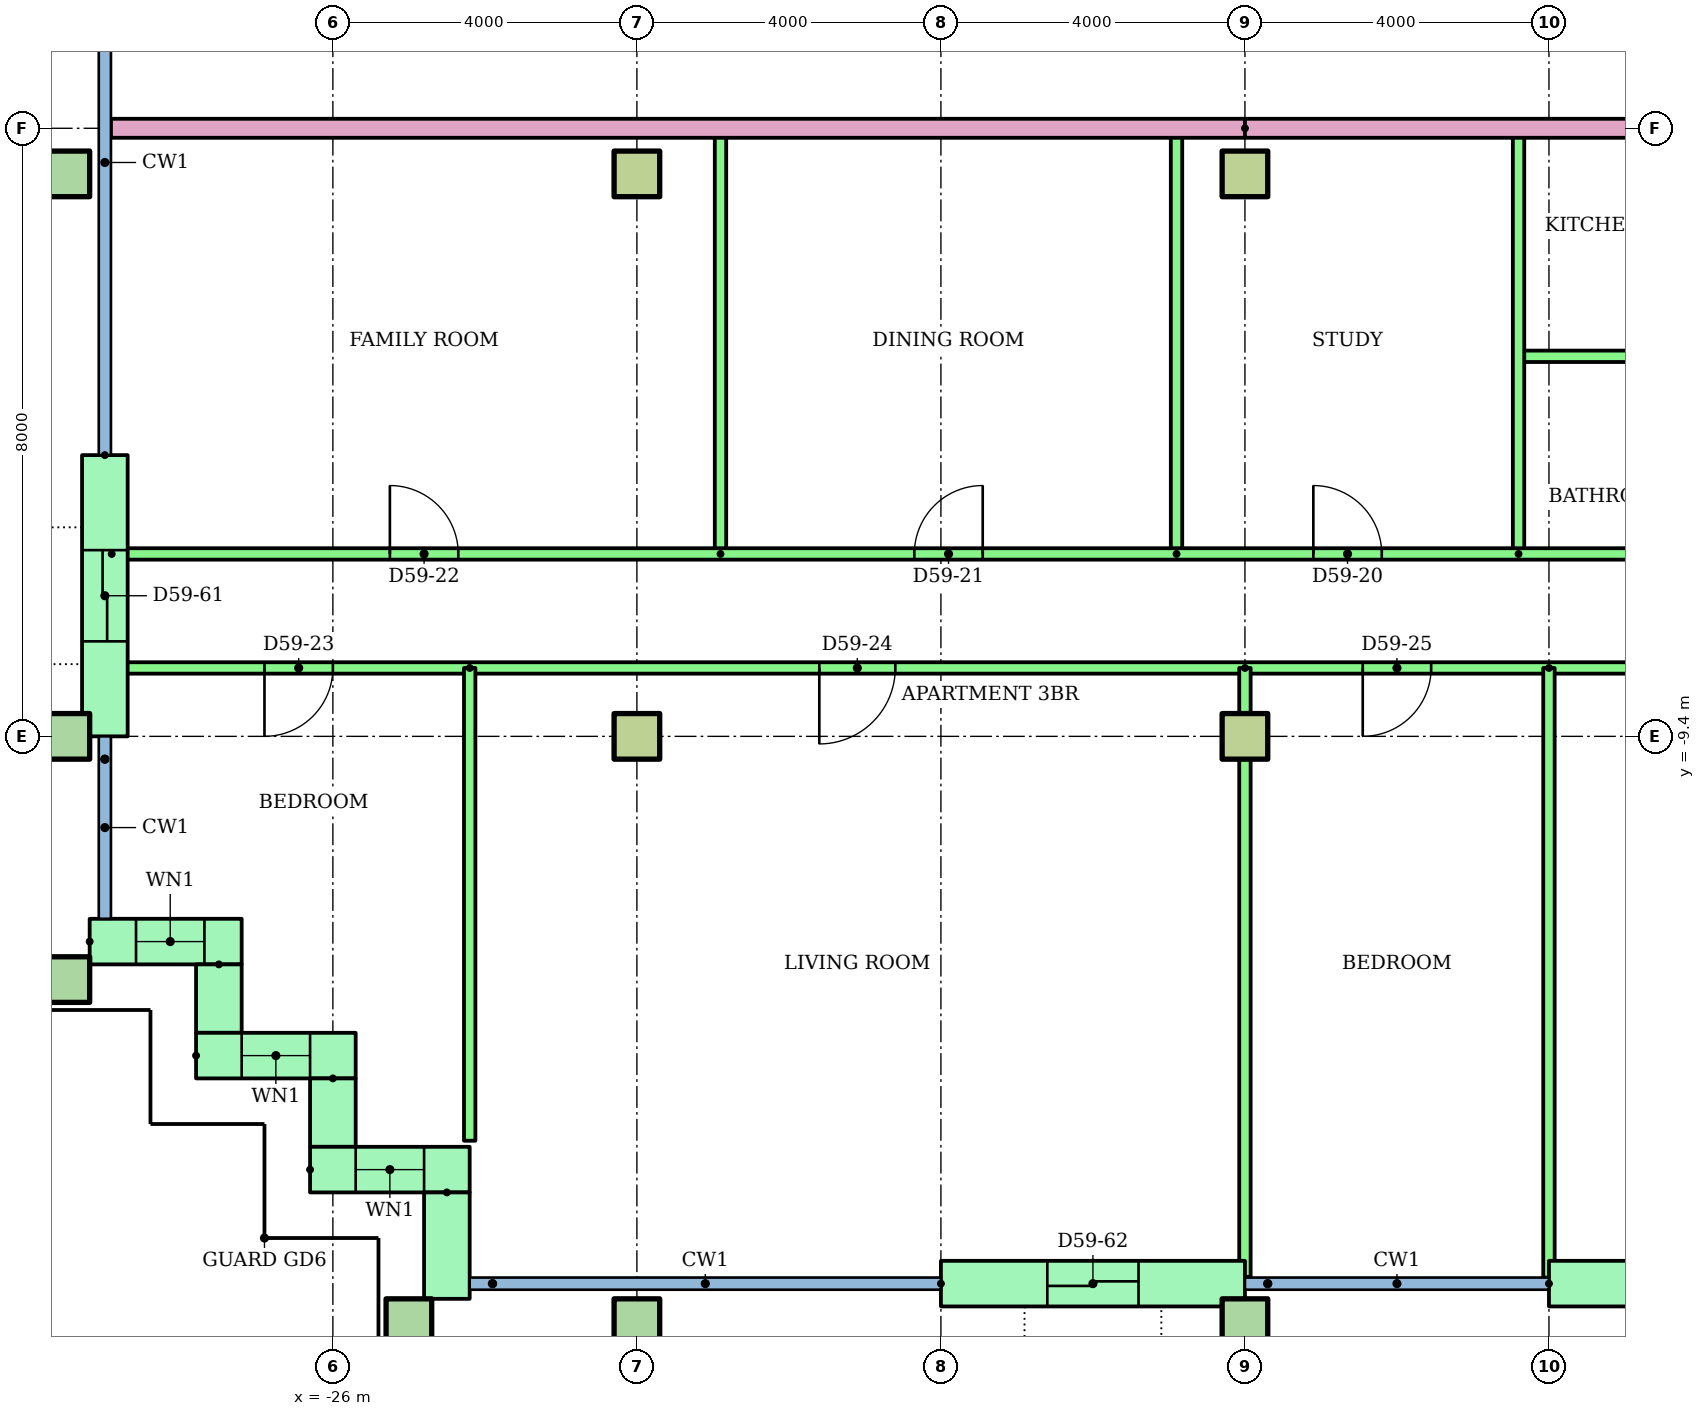
"""IFC4 building model, lengths in metres.
Left out: names, types, materials, properties, quantities, classifications, styles, units other than length and angle.
Written with IfcOpenShell. Run it as: python <this file> out.ifc"""

import sys

from ifc_helpers import new_model, si_unit, direction, frame, frame_2d, origin, origin_2d, place, context, subcontext, project, spatial, rectangle, hollow_rectangle, extrude, element, fill, save


model = new_model("IFC4")
c1 = context("Model", 3, precision=1e-05, world=origin(), true_north=direction((0.0, 1.0)))
c2 = subcontext(c1, "Body", "Model", "MODEL_VIEW")
j1 = project(units=[si_unit("LENGTHUNIT", "METRE"), si_unit("PLANEANGLEUNIT", "RADIAN")], contexts=[c1])
p1 = place(None, origin())
s1 = spatial("IfcSite", under=j1, at=p1, CompositionType="ELEMENT")
p2 = place(p1, origin())
s2 = spatial("IfcBuilding", under=s1, at=p2, CompositionType="ELEMENT")
p3 = place(p2, frame((0.0, 0.0, 226.8)))
s3 = spatial("IfcBuildingStorey", under=s2, at=p3, CompositionType="ELEMENT", Elevation=226.8)
for number, where in (
    (1, (-25.0, -17.1, 0.0)),
    (2, (-22.0, -17.1, 0.0)),
    (3, (-14.0, -17.1, 0.0)),
    (4, (-29.5, -12.6, 0.0)),
    (5, (-29.5, -9.4, 0.0)),
):
    element("IfcColumn", number, at=place(p3, frame(where)), inside=s3, PredefinedType="COLUMN", context=c2, shape_type="SweptSolid", body=[
        extrude(hollow_rectangle(XDim=0.6, YDim=0.6, WallThickness=0.03, at=origin_2d()), origin(), (0.0, 0.0, 1.0), 3.2),
    ])
for number, where in (
    (6, (-22.0, -9.4, 0.0)),
    (7, (-14.0, -9.4, 0.0)),
):
    element("IfcColumn", number, at=place(p3, frame(where)), inside=s3, PredefinedType="COLUMN", context=c2, shape_type="SweptSolid", body=[
        extrude(rectangle(XDim=0.6, YDim=0.6, at=origin_2d()), origin(), (0.0, 0.0, 1.0), 3.2),
    ])
p4 = place(p3, frame((-29.5, -2.0, 0.0)))
e8 = element("IfcColumn", 8, at=p4, inside=s3, PredefinedType="COLUMN", context=c2, shape_type="SweptSolid", body=[
    extrude(hollow_rectangle(XDim=0.6, YDim=0.6, WallThickness=0.03, at=origin_2d()), origin(), (0.0, 0.0, 1.0), 3.2),
])
for number, where in (
    (9, (-22.0, -2.0, 0.0)),
    (10, (-14.0, -2.0, 0.0)),
):
    element("IfcColumn", number, at=place(p3, frame(where)), inside=s3, PredefinedType="COLUMN", context=c2, shape_type="SweptSolid", body=[
        extrude(rectangle(XDim=0.6, YDim=0.6, at=origin_2d()), origin(), (0.0, 0.0, 1.0), 3.2),
    ])
p5 = place(p3, frame((-29.0, -5.7, 0.0), z_axis=(0.0, 0.0, 1.0), x_axis=(0.0, -1.0, 0.0)))
e11 = element("IfcWall", 11, at=p5, inside=s3, PredefinedType="STANDARD", context=c2, shape_type="SweptSolid", body=[
    extrude(rectangle(XDim=3.7, YDim=0.6, at=frame_2d((1.85, 0.0))), origin(), (0.0, 0.0, 1.0), 2.92),
])
p6 = place(p5, frame((1.25, 0.0, 0.0)))
e12 = element("IfcOpeningElement", 12, at=p6, cuts=e11, PredefinedType="OPENING", context=c2, shape_type="SweptSolid", body=[
    extrude(rectangle(XDim=1.2, YDim=2.1, at=frame_2d((0.6, 1.05))), frame((0.0, 0.31, 0.0), z_axis=(0.0, -1.0, 0.0), x_axis=(1.0, 0.0, 0.0)), (0.0, 0.0, 1.0), 0.62),
])
p7 = place(p3, frame((-29.2, -12.1, 0.0)))
e13 = element("IfcWall", 13, at=p7, inside=s3, PredefinedType="STANDARD", context=c2, shape_type="SweptSolid", body=[
    extrude(rectangle(XDim=2.0, YDim=0.6, at=frame_2d((1.0, 0.0))), origin(), (0.0, 0.0, 1.0), 2.92),
])
p8 = place(p7, frame((0.61, 0.0, 0.9)))
e14 = element("IfcOpeningElement", 14, at=p8, cuts=e13, PredefinedType="OPENING", context=c2, shape_type="SweptSolid", body=[
    extrude(rectangle(XDim=0.9, YDim=1.5, at=frame_2d((0.45, 0.75))), frame((0.0, 0.31, 0.0), z_axis=(0.0, -1.0, 0.0), x_axis=(1.0, 0.0, 0.0)), (0.0, 0.0, 1.0), 0.62),
])
p9 = place(p3, frame((-27.5, -12.4, 0.0), z_axis=(0.0, 0.0, 1.0), x_axis=(0.0, -1.0, 0.0)))
e15 = element("IfcWall", 15, at=p9, inside=s3, PredefinedType="STANDARD", context=c2, shape_type="SweptSolid", body=[
    extrude(rectangle(XDim=0.9, YDim=0.6, at=frame_2d((0.45, 0.0))), origin(), (0.0, 0.0, 1.0), 2.92),
])
p10 = place(p3, frame((-27.8, -13.6, 0.0)))
e16 = element("IfcWall", 16, at=p10, inside=s3, PredefinedType="STANDARD", context=c2, shape_type="SweptSolid", body=[
    extrude(rectangle(XDim=2.1, YDim=0.6, at=frame_2d((1.05, 0.0))), origin(), (0.0, 0.0, 1.0), 2.92),
])
p11 = place(p10, frame((0.6, 0.0, 0.9)))
e17 = element("IfcOpeningElement", 17, at=p11, cuts=e16, PredefinedType="OPENING", context=c2, shape_type="SweptSolid", body=[
    extrude(rectangle(XDim=0.9, YDim=1.5, at=frame_2d((0.45, 0.75))), frame((0.0, 0.31, 0.0), z_axis=(0.0, -1.0, 0.0), x_axis=(1.0, 0.0, 0.0)), (0.0, 0.0, 1.0), 0.62),
])
p12 = place(p3, frame((-26.0, -13.9, 0.0), z_axis=(0.0, 0.0, 1.0), x_axis=(0.0, -1.0, 0.0)))
e18 = element("IfcWall", 18, at=p12, inside=s3, PredefinedType="STANDARD", context=c2, shape_type="SweptSolid", body=[
    extrude(rectangle(XDim=0.9, YDim=0.6, at=frame_2d((0.45, 0.0))), origin(), (0.0, 0.0, 1.0), 2.92),
])
p13 = place(p3, frame((-26.3, -15.1, 0.0)))
e19 = element("IfcWall", 19, at=p13, inside=s3, PredefinedType="STANDARD", context=c2, shape_type="SweptSolid", body=[
    extrude(rectangle(XDim=2.1, YDim=0.6, at=frame_2d((1.05, 0.0))), origin(), (0.0, 0.0, 1.0), 2.92),
])
p14 = place(p13, frame((0.6, 0.0, 0.9)))
e20 = element("IfcOpeningElement", 20, at=p14, cuts=e19, PredefinedType="OPENING", context=c2, shape_type="SweptSolid", body=[
    extrude(rectangle(XDim=0.9, YDim=1.5, at=frame_2d((0.45, 0.75))), frame((0.0, 0.31, 0.0), z_axis=(0.0, -1.0, 0.0), x_axis=(1.0, 0.0, 0.0)), (0.0, 0.0, 1.0), 0.62),
])
p15 = place(p3, frame((-24.5, -15.4, 0.0), z_axis=(0.0, 0.0, 1.0), x_axis=(0.0, -1.0, 0.0)))
e21 = element("IfcWall", 21, at=p15, inside=s3, PredefinedType="STANDARD", context=c2, shape_type="SweptSolid", body=[
    extrude(rectangle(XDim=1.4, YDim=0.6, at=frame_2d((0.7, 0.0))), origin(), (0.0, 0.0, 1.0), 2.92),
])
p16 = place(p3, frame((-18.0, -16.6, 0.0)))
e22 = element("IfcWall", 22, at=p16, inside=s3, PredefinedType="STANDARD", context=c2, shape_type="SweptSolid", body=[
    extrude(rectangle(XDim=4.0, YDim=0.6, at=frame_2d((2.0, 0.0))), origin(), (0.0, 0.0, 1.0), 2.92),
])
p17 = place(p16, frame((1.4, 0.0, 0.0)))
e23 = element("IfcOpeningElement", 23, at=p17, cuts=e22, PredefinedType="OPENING", context=c2, shape_type="SweptSolid", body=[
    extrude(rectangle(XDim=1.2, YDim=2.1, at=frame_2d((0.6, 1.05))), frame((0.0, 0.31, 0.0), z_axis=(0.0, -1.0, 0.0), x_axis=(1.0, 0.0, 0.0)), (0.0, 0.0, 1.0), 0.62),
])
p18 = place(p3, frame((-10.0, -16.6, 0.0)))
e24 = element("IfcWall", 24, at=p18, inside=s3, PredefinedType="STANDARD", context=c2, shape_type="SweptSolid", body=[
    extrude(rectangle(XDim=4.0, YDim=0.6, at=frame_2d((2.0, 0.0))), origin(), (0.0, 0.0, 1.0), 2.92),
])
p19 = place(p18, frame((1.4, 0.0, 0.0)))
e25 = element("IfcOpeningElement", 25, at=p19, cuts=e24, PredefinedType="OPENING", context=c2, shape_type="SweptSolid", body=[
    extrude(rectangle(XDim=1.2, YDim=2.1, at=frame_2d((0.6, 1.05))), frame((0.0, 0.31, 0.0), z_axis=(0.0, -1.0, 0.0), x_axis=(1.0, 0.0, 0.0)), (0.0, 0.0, 1.0), 0.62),
])
p20 = place(p3, frame((-8.0, -4.4, 0.0), z_axis=(0.0, 0.0, 1.0), x_axis=(-1.0, 0.0, 0.0)))
e26 = element("IfcWall", 26, at=p20, inside=s3, PredefinedType="PARTITIONING", context=c2, shape_type="SweptSolid", body=[
    extrude(rectangle(XDim=2.4, YDim=0.15, at=frame_2d((1.2, 0.0))), origin(), (0.0, 0.0, 1.0), 2.4),
])
for number, where, z_axis, x_axis in (
    (27, (-10.4, -7.0, 0.0), (0.0, 0.0, 1.0), (0.0, 1.0, 0.0)),
    (28, (-14.9, -7.0, 0.0), (0.0, 0.0, 1.0), (0.0, 1.0, 0.0)),
    (29, (-20.9, -7.0, 0.0), (0.0, 0.0, 1.0), (0.0, 1.0, 0.0)),
):
    element("IfcWall", number, at=place(p3, frame(where, z_axis=z_axis, x_axis=x_axis)), inside=s3, PredefinedType="PARTITIONING", context=c2, shape_type="SweptSolid", body=[
        extrude(rectangle(XDim=5.6, YDim=0.15, at=frame_2d((2.8, 0.0))), origin(), (0.0, 0.0, 1.0), 2.4),
    ])
p21 = place(p3, frame((-28.91, -7.0, 0.0)))
e30 = element("IfcWall", 30, at=p21, inside=s3, PredefinedType="PARTITIONING", context=c2, shape_type="SweptSolid", body=[
    extrude(rectangle(XDim=20.91, YDim=0.15, at=frame_2d((10.455, 0.0))), origin(), (0.0, 0.0, 1.0), 2.4),
])
p22 = place(p21, frame((15.81, 0.0, 0.0)))
e31 = element("IfcOpeningElement", 31, at=p22, cuts=e30, PredefinedType="OPENING", context=c2, shape_type="SweptSolid", body=[
    extrude(rectangle(XDim=0.9, YDim=2.1, at=frame_2d((0.45, 1.05))), frame((0.0, 0.085, 0.0), z_axis=(0.0, -1.0, 0.0), x_axis=(1.0, 0.0, 0.0)), (0.0, 0.0, 1.0), 0.17),
])
p23 = place(p21, frame((10.56, 0.0, 0.0)))
e32 = element("IfcOpeningElement", 32, at=p23, cuts=e30, PredefinedType="OPENING", context=c2, shape_type="SweptSolid", body=[
    extrude(rectangle(XDim=0.9, YDim=2.1, at=frame_2d((0.45, 1.05))), frame((0.0, 0.085, 0.0), z_axis=(0.0, -1.0, 0.0), x_axis=(1.0, 0.0, 0.0)), (0.0, 0.0, 1.0), 0.17),
])
p24 = place(p21, frame((3.66, 0.0, 0.0)))
e33 = element("IfcOpeningElement", 33, at=p24, cuts=e30, PredefinedType="OPENING", context=c2, shape_type="SweptSolid", body=[
    extrude(rectangle(XDim=0.9, YDim=2.1, at=frame_2d((0.45, 1.05))), frame((0.0, 0.085, 0.0), z_axis=(0.0, -1.0, 0.0), x_axis=(1.0, 0.0, 0.0)), (0.0, 0.0, 1.0), 0.17),
])
p25 = place(p3, frame((-6.0, -8.5, 0.0), z_axis=(0.0, 0.0, 1.0), x_axis=(-1.0, 0.0, 0.0)))
e34 = element("IfcWall", 34, at=p25, inside=s3, PredefinedType="PARTITIONING", context=c2, shape_type="SweptSolid", body=[
    extrude(rectangle(XDim=22.91, YDim=0.15, at=frame_2d((11.455, 0.0))), origin(), (0.0, 0.0, 1.0), 2.4),
])
p26 = place(p25, frame((20.0, 0.0, 0.0)))
e35 = element("IfcOpeningElement", 35, at=p26, cuts=e34, PredefinedType="OPENING", context=c2, shape_type="SweptSolid", body=[
    extrude(rectangle(XDim=0.9, YDim=2.1, at=frame_2d((0.45, 1.05))), frame((0.0, 0.085, 0.0), z_axis=(0.0, -1.0, 0.0), x_axis=(1.0, 0.0, 0.0)), (0.0, 0.0, 1.0), 0.17),
])
p27 = place(p25, frame((12.6, 0.0, 0.0)))
e36 = element("IfcOpeningElement", 36, at=p27, cuts=e34, PredefinedType="OPENING", context=c2, shape_type="SweptSolid", body=[
    extrude(rectangle(XDim=1.0, YDim=2.1, at=frame_2d((0.5, 1.05))), frame((0.0, 0.085, 0.0), z_axis=(0.0, -1.0, 0.0), x_axis=(1.0, 0.0, 0.0)), (0.0, 0.0, 1.0), 0.17),
])
p28 = place(p25, frame((5.55, 0.0, 0.0)))
e37 = element("IfcOpeningElement", 37, at=p28, cuts=e34, PredefinedType="OPENING", context=c2, shape_type="SweptSolid", body=[
    extrude(rectangle(XDim=0.9, YDim=2.1, at=frame_2d((0.45, 1.05))), frame((0.0, 0.085, 0.0), z_axis=(0.0, -1.0, 0.0), x_axis=(1.0, 0.0, 0.0)), (0.0, 0.0, 1.0), 0.17),
])
p29 = place(p25, frame((1.55, 0.0, 0.0)))
e38 = element("IfcOpeningElement", 38, at=p29, cuts=e34, PredefinedType="OPENING", context=c2, shape_type="SweptSolid", body=[
    extrude(rectangle(XDim=0.9, YDim=2.1, at=frame_2d((0.45, 1.05))), frame((0.0, 0.085, 0.0), z_axis=(0.0, -1.0, 0.0), x_axis=(1.0, 0.0, 0.0)), (0.0, 0.0, 1.0), 0.17),
])
p30 = place(p3, frame((-24.2, -8.5, 0.0), z_axis=(0.0, 0.0, 1.0), x_axis=(0.0, -1.0, 0.0)))
e39 = element("IfcWall", 39, at=p30, inside=s3, PredefinedType="PARTITIONING", context=c2, shape_type="SweptSolid", body=[
    extrude(rectangle(XDim=6.22, YDim=0.15, at=frame_2d((3.11, 0.0))), origin(), (0.0, 0.0, 1.0), 2.4),
])
p31 = place(p3, frame((-14.0, -8.5, 0.0), z_axis=(0.0, 0.0, 1.0), x_axis=(0.0, -1.0, 0.0)))
e40 = element("IfcWall", 40, at=p31, inside=s3, PredefinedType="PARTITIONING", context=c2, shape_type="SweptSolid", body=[
    extrude(rectangle(XDim=8.01, YDim=0.15, at=frame_2d((4.005, 0.0))), origin(), (0.0, 0.0, 1.0), 2.4),
])
p32 = place(p3, frame((-10.0, -8.5, 0.0), z_axis=(0.0, 0.0, 1.0), x_axis=(0.0, -1.0, 0.0)))
e41 = element("IfcWall", 41, at=p32, inside=s3, PredefinedType="PARTITIONING", context=c2, shape_type="SweptSolid", body=[
    extrude(rectangle(XDim=8.021, YDim=0.15, at=frame_2d((4.01, 0.0))), origin(), (0.0, 0.0, 1.0), 2.4),
])
p33 = place(p3, frame((-14.0, -1.4, 0.0), z_axis=(0.0, 0.0, 1.0), x_axis=(-1.0, 0.0, 0.0)))
e42 = element("IfcWall", 42, at=p33, inside=s3, PredefinedType="PARTITIONING", context=c2, shape_type="SweptSolid", body=[
    extrude(rectangle(XDim=14.92, YDim=0.25, at=frame_2d((7.46, 0.0))), origin(), (0.0, 0.0, 1.0), 2.4),
])
p34 = place(p3, frame((14.0, -1.4, 0.0), z_axis=(0.0, 0.0, 1.0), x_axis=(-1.0, 0.0, 0.0)))
e43 = element("IfcWall", 43, at=p34, inside=s3, PredefinedType="PARTITIONING", context=c2, shape_type="SweptSolid", body=[
    extrude(rectangle(XDim=28.0, YDim=0.25, at=frame_2d((14.0, 0.0))), origin(), (0.0, 0.0, 1.0), 2.4),
])
p35 = place(p34, frame((20.5, 0.0, 0.0)))
e44 = element("IfcOpeningElement", 44, at=p35, cuts=e43, PredefinedType="OPENING", context=c2, shape_type="SweptSolid", body=[
    extrude(rectangle(XDim=1.0, YDim=2.1, at=frame_2d((0.5, 1.05))), frame((0.0, 0.135, 0.0), z_axis=(0.0, -1.0, 0.0), x_axis=(1.0, 0.0, 0.0)), (0.0, 0.0, 1.0), 0.27),
])
p36 = place(p34, frame((18.5, 0.0, 0.0)))
e45 = element("IfcOpeningElement", 45, at=p36, cuts=e43, PredefinedType="OPENING", context=c2, shape_type="SweptSolid", body=[
    extrude(rectangle(XDim=1.0, YDim=2.1, at=frame_2d((0.5, 1.05))), frame((0.0, 0.135, 0.0), z_axis=(0.0, -1.0, 0.0), x_axis=(1.0, 0.0, 0.0)), (0.0, 0.0, 1.0), 0.27),
])
p37 = place(p34, frame((2.5, 0.0, 0.0)))
e46 = element("IfcOpeningElement", 46, at=p37, cuts=e43, PredefinedType="OPENING", context=c2, shape_type="SweptSolid", body=[
    extrude(rectangle(XDim=1.0, YDim=2.1, at=frame_2d((0.5, 1.05))), frame((0.0, 0.135, 0.0), z_axis=(0.0, -1.0, 0.0), x_axis=(1.0, 0.0, 0.0)), (0.0, 0.0, 1.0), 0.27),
])
p38 = place(p8, origin())
e47 = element("IfcWindow", 47, at=p38, inside=s3, PartitioningType="SINGLE_PANEL", PredefinedType="WINDOW", context=c2, shape_type="SweptSolid", body=[
    extrude(rectangle(XDim=0.9, YDim=1.5, at=frame_2d((0.45, 0.75))), frame((0.0, 0.03, 0.0), z_axis=(0.0, -1.0, 0.0), x_axis=(1.0, 0.0, 0.0)), (0.0, 0.0, 1.0), 0.06),
])
fill(e14, e47)
p39 = place(p11, origin())
e48 = element("IfcWindow", 48, at=p39, inside=s3, PartitioningType="SINGLE_PANEL", PredefinedType="WINDOW", context=c2, shape_type="SweptSolid", body=[
    extrude(rectangle(XDim=0.9, YDim=1.5, at=frame_2d((0.45, 0.75))), frame((0.0, 0.03, 0.0), z_axis=(0.0, -1.0, 0.0), x_axis=(1.0, 0.0, 0.0)), (0.0, 0.0, 1.0), 0.06),
])
fill(e17, e48)
p40 = place(p14, origin())
e49 = element("IfcWindow", 49, at=p40, inside=s3, PartitioningType="SINGLE_PANEL", PredefinedType="WINDOW", context=c2, shape_type="SweptSolid", body=[
    extrude(rectangle(XDim=0.9, YDim=1.5, at=frame_2d((0.45, 0.75))), frame((0.0, 0.03, 0.0), z_axis=(0.0, -1.0, 0.0), x_axis=(1.0, 0.0, 0.0)), (0.0, 0.0, 1.0), 0.06),
])
fill(e20, e49)
p41 = place(p22, origin())
e50 = element("IfcDoor", 50, at=p41, inside=s3, OperationType="SINGLE_SWING_LEFT", PredefinedType="DOOR", context=c2, shape_type="SweptSolid", body=[
    extrude(rectangle(XDim=0.9, YDim=2.1, at=frame_2d((0.45, 1.05))), frame((0.0, 0.025, 0.0), z_axis=(0.0, -1.0, 0.0), x_axis=(1.0, 0.0, 0.0)), (0.0, 0.0, 1.0), 0.05),
])
fill(e31, e50)
p42 = place(p23, origin())
e51 = element("IfcDoor", 51, at=p42, inside=s3, OperationType="SINGLE_SWING_RIGHT", PredefinedType="DOOR", context=c2, shape_type="SweptSolid", body=[
    extrude(rectangle(XDim=0.9, YDim=2.1, at=frame_2d((0.45, 1.05))), frame((0.0, 0.025, 0.0), z_axis=(0.0, -1.0, 0.0), x_axis=(1.0, 0.0, 0.0)), (0.0, 0.0, 1.0), 0.05),
])
fill(e32, e51)
p43 = place(p24, origin())
e52 = element("IfcDoor", 52, at=p43, inside=s3, OperationType="SINGLE_SWING_LEFT", PredefinedType="DOOR", context=c2, shape_type="SweptSolid", body=[
    extrude(rectangle(XDim=0.9, YDim=2.1, at=frame_2d((0.45, 1.05))), frame((0.0, 0.025, 0.0), z_axis=(0.0, -1.0, 0.0), x_axis=(1.0, 0.0, 0.0)), (0.0, 0.0, 1.0), 0.05),
])
fill(e33, e52)
p44 = place(p26, origin())
e53 = element("IfcDoor", 53, at=p44, inside=s3, OperationType="SINGLE_SWING_RIGHT", PredefinedType="DOOR", context=c2, shape_type="SweptSolid", body=[
    extrude(rectangle(XDim=0.9, YDim=2.1, at=frame_2d((0.45, 1.05))), frame((0.0, 0.025, 0.0), z_axis=(0.0, -1.0, 0.0), x_axis=(1.0, 0.0, 0.0)), (0.0, 0.0, 1.0), 0.05),
])
fill(e35, e53)
p45 = place(p27, origin())
e54 = element("IfcDoor", 54, at=p45, inside=s3, OperationType="SINGLE_SWING_RIGHT", PredefinedType="DOOR", context=c2, shape_type="SweptSolid", body=[
    extrude(rectangle(XDim=1.0, YDim=2.1, at=frame_2d((0.5, 1.05))), frame((0.0, 0.025, 0.0), z_axis=(0.0, -1.0, 0.0), x_axis=(1.0, 0.0, 0.0)), (0.0, 0.0, 1.0), 0.05),
])
fill(e36, e54)
p46 = place(p28, origin())
e55 = element("IfcDoor", 55, at=p46, inside=s3, OperationType="SINGLE_SWING_RIGHT", PredefinedType="DOOR", context=c2, shape_type="SweptSolid", body=[
    extrude(rectangle(XDim=0.9, YDim=2.1, at=frame_2d((0.45, 1.05))), frame((0.0, 0.025, 0.0), z_axis=(0.0, -1.0, 0.0), x_axis=(1.0, 0.0, 0.0)), (0.0, 0.0, 1.0), 0.05),
])
fill(e37, e55)
p47 = place(p6, origin())
e56 = element("IfcDoor", 56, at=p47, inside=s3, OperationType="SLIDING_TO_LEFT", PredefinedType="DOOR", context=c2, shape_type="SweptSolid", body=[
    extrude(rectangle(XDim=1.2, YDim=2.1, at=frame_2d((0.6, 1.05))), frame((0.0, 0.025, 0.0), z_axis=(0.0, -1.0, 0.0), x_axis=(1.0, 0.0, 0.0)), (0.0, 0.0, 1.0), 0.05),
])
fill(e12, e56)
p48 = place(p17, origin())
e57 = element("IfcDoor", 57, at=p48, inside=s3, OperationType="SLIDING_TO_LEFT", PredefinedType="DOOR", context=c2, shape_type="SweptSolid", body=[
    extrude(rectangle(XDim=1.2, YDim=2.1, at=frame_2d((0.6, 1.05))), frame((0.0, 0.025, 0.0), z_axis=(0.0, -1.0, 0.0), x_axis=(1.0, 0.0, 0.0)), (0.0, 0.0, 1.0), 0.05),
])
fill(e23, e57)
save(model, sys.argv[1])
